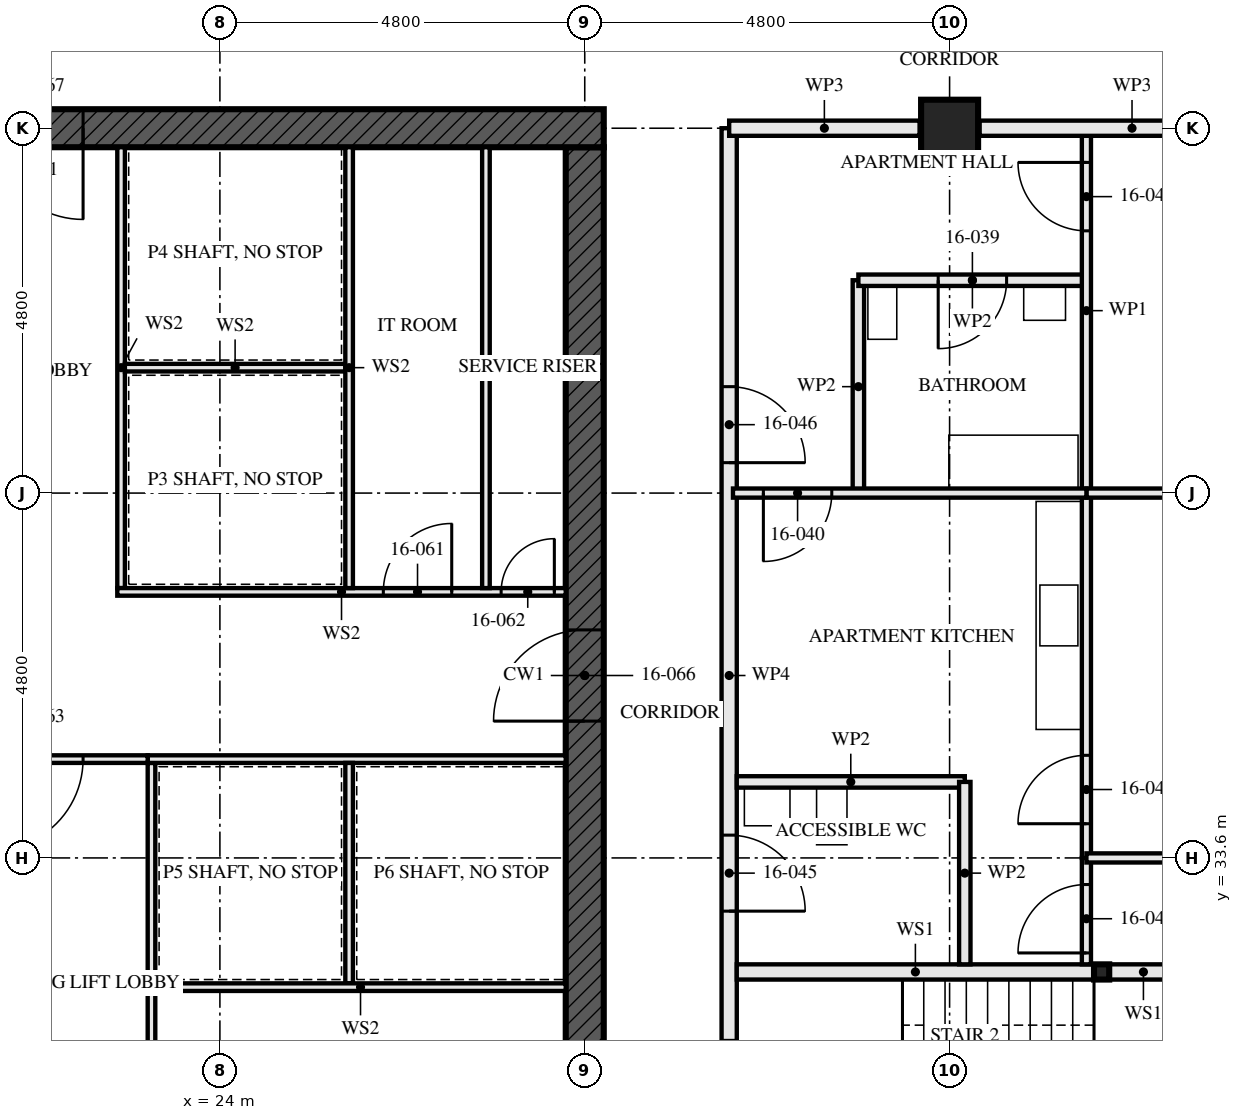
"""IFC4 building model, lengths in metres.
Left out: names, types, materials, properties, quantities, classifications, styles, units other than length and angle.
Written with IfcOpenShell. Run it as: python <this file> out.ifc"""

import sys

from ifc_helpers import new_model, si_unit, direction, frame, frame_2d, origin, origin_2d, place, context, subcontext, project, spatial, rectangle, hollow_rectangle, extrude, element, fill, save


model = new_model("IFC4")
c1 = context("Model", 3, precision=1e-05, world=origin(), true_north=direction((0.0, 1.0)))
c2 = subcontext(c1, "Body", "Model", "MODEL_VIEW")
j1 = project(units=[si_unit("LENGTHUNIT", "METRE"), si_unit("PLANEANGLEUNIT", "RADIAN")], contexts=[c1])
p1 = place(None, origin())
s1 = spatial("IfcSite", under=j1, at=p1, CompositionType="ELEMENT")
p2 = place(p1, origin())
s2 = spatial("IfcBuilding", under=s1, at=p2, CompositionType="ELEMENT")
p3 = place(p2, frame((0.0, 0.0, 62.0)))
s3 = spatial("IfcBuildingStorey", under=s2, at=p3, CompositionType="ELEMENT", Elevation=62.0)
p4 = place(p3, frame((33.6, 43.2, 0.0), z_axis=(0.0, 0.0, 1.0), x_axis=(0.0, 1.0, 0.0)))
e1 = element("IfcColumn", 1, at=p4, inside=s3, PredefinedType="COLUMN", context=c2, shape_type="SweptSolid", body=[
    extrude(hollow_rectangle(XDim=0.75, YDim=0.75, WallThickness=0.08, at=origin_2d()), origin(), (0.0, 0.0, 1.0), 3.5),
])
p5 = place(p3, frame((29.05, 43.2, -0.17), z_axis=(0.0, 0.0, 1.0), x_axis=(-1.0, 0.0, 0.0)))
e2 = element("IfcWall", 2, at=p5, inside=s3, PredefinedType="SHEAR", context=c2, shape_type="SweptSolid", body=[
    extrude(rectangle(XDim=14.9, YDim=0.5, at=frame_2d((7.45, 0.0))), origin(), (0.0, 0.0, 1.0), 3.5),
])
p6 = place(p5, frame((6.85, 0.0, 0.17)))
e3 = element("IfcOpeningElement", 3, at=p6, cuts=e2, PredefinedType="OPENING", context=c2, shape_type="SweptSolid", body=[
    extrude(rectangle(XDim=1.2, YDim=2.1, at=frame_2d((0.6, 1.05))), frame((0.0, 0.26, 0.0), z_axis=(0.0, -1.0, 0.0), x_axis=(1.0, 0.0, 0.0)), (0.0, 0.0, 1.0), 0.521),
])
p7 = place(p3, frame((28.8, 29.05, -0.17), z_axis=(0.0, 0.0, 1.0), x_axis=(0.0, 1.0, 0.0)))
e4 = element("IfcWall", 4, at=p7, inside=s3, PredefinedType="SHEAR", context=c2, shape_type="SweptSolid", body=[
    extrude(rectangle(XDim=13.9, YDim=0.5, at=frame_2d((6.95, 0.0))), origin(), (0.0, 0.0, 1.0), 3.5),
])
p8 = place(p7, frame((6.35, 0.0, 0.17)))
e5 = element("IfcOpeningElement", 5, at=p8, cuts=e4, PredefinedType="OPENING", context=c2, shape_type="SweptSolid", body=[
    extrude(rectangle(XDim=1.2, YDim=2.1, at=frame_2d((0.6, 1.05))), frame((0.0, 0.26, 0.0), z_axis=(0.0, -1.0, 0.0), x_axis=(1.0, 0.0, 0.0)), (0.0, 0.0, 1.0), 0.521),
])
p9 = place(p3, frame((35.6, 32.1, 0.0), z_axis=(0.0, 0.0, 1.0), x_axis=(1.0, 0.0, 0.0)))
e6 = element("IfcColumn", 6, at=p9, inside=s3, PredefinedType="COLUMN", context=c2, shape_type="SweptSolid", body=[
    extrude(hollow_rectangle(XDim=0.2, YDim=0.2, WallThickness=0.008, at=origin_2d()), origin(), (0.0, 0.0, 1.0), 3.33),
])
p10 = place(p3, frame((36.6, 32.1, 0.0), z_axis=(0.0, 0.0, 1.0), x_axis=(-1.0, 0.0, 0.0)))
e7 = element("IfcWall", 7, at=p10, inside=s3, PredefinedType="SOLIDWALL", context=c2, shape_type="SweptSolid", body=[
    extrude(rectangle(XDim=0.9, YDim=0.2, at=frame_2d((0.45, 0.0))), origin(), (0.0, 0.0, 1.0), 2.99),
])
p11 = place(p3, frame((35.5, 32.1, 0.0), z_axis=(0.0, 0.0, 1.0), x_axis=(-1.0, 0.0, 0.0)))
e8 = element("IfcWall", 8, at=p11, inside=s3, PredefinedType="SOLIDWALL", context=c2, shape_type="SweptSolid", body=[
    extrude(rectangle(XDim=4.7, YDim=0.2, at=frame_2d((2.35, 0.0))), origin(), (0.0, 0.0, 1.0), 2.99),
])
p12 = place(p3, frame((33.8, 32.2, 0.0), z_axis=(0.0, 0.0, 1.0), x_axis=(0.0, 1.0, 0.0)))
e9 = element("IfcWall", 9, at=p12, inside=s3, PredefinedType="PARTITIONING", context=c2, shape_type="SweptSolid", body=[
    extrude(rectangle(XDim=2.4, YDim=0.15, at=frame_2d((1.2, 0.0))), origin(), (0.0, 0.0, 1.0), 2.55),
])
p13 = place(p3, frame((33.8, 34.6, 0.0), z_axis=(0.0, 0.0, 1.0), x_axis=(-1.0, 0.0, 0.0)))
e10 = element("IfcWall", 10, at=p13, inside=s3, PredefinedType="PARTITIONING", context=c2, shape_type="SweptSolid", body=[
    extrude(rectangle(XDim=3.0, YDim=0.15, at=frame_2d((1.5, 0.0))), origin(), (0.0, 0.0, 1.0), 3.33),
])
p14 = place(p3, frame((35.4, 41.2, 0.0), z_axis=(0.0, 0.0, 1.0), x_axis=(-1.0, 0.0, 0.0)))
e11 = element("IfcWall", 11, at=p14, inside=s3, PredefinedType="PARTITIONING", context=c2, shape_type="SweptSolid", body=[
    extrude(rectangle(XDim=3.0, YDim=0.15, at=frame_2d((1.5, 0.0))), origin(), (0.0, 0.0, 1.0), 3.33),
])
p15 = place(p14, frame((1.05, 0.0, 0.0)))
e12 = element("IfcOpeningElement", 12, at=p15, cuts=e11, PredefinedType="OPENING", context=c2, shape_type="SweptSolid", body=[
    extrude(rectangle(XDim=0.9, YDim=2.1, at=frame_2d((0.45, 1.05))), frame((0.0, 0.085, 0.0), z_axis=(0.0, -1.0, 0.0), x_axis=(1.0, 0.0, 0.0)), (0.0, 0.0, 1.0), 0.171),
])
p16 = place(p3, frame((32.4, 38.4, 0.0), z_axis=(0.0, 0.0, 1.0), x_axis=(0.0, 1.0, 0.0)))
e13 = element("IfcWall", 13, at=p16, inside=s3, PredefinedType="PARTITIONING", context=c2, shape_type="SweptSolid", body=[
    extrude(rectangle(XDim=2.8, YDim=0.15, at=frame_2d((1.4, 0.0))), origin(), (0.0, 0.0, 1.0), 3.33),
])
p17 = place(p3, frame((35.4, 38.4, 0.0), z_axis=(0.0, 0.0, 1.0), x_axis=(-1.0, 0.0, 0.0)))
e14 = element("IfcWall", 14, at=p17, inside=s3, PredefinedType="PARTITIONING", context=c2, shape_type="SweptSolid", body=[
    extrude(rectangle(XDim=4.65, YDim=0.12, at=frame_2d((2.325, 0.0))), origin(), (0.0, 0.0, 1.0), 2.55),
])
p18 = place(p17, frame((3.35, 0.0, 0.0)))
e15 = element("IfcOpeningElement", 15, at=p18, cuts=e14, PredefinedType="OPENING", context=c2, shape_type="SweptSolid", body=[
    extrude(rectangle(XDim=0.9, YDim=2.1, at=frame_2d((0.45, 1.05))), frame((0.0, 0.071, 0.0), z_axis=(0.0, -1.0, 0.0), x_axis=(1.0, 0.0, 0.0)), (0.0, 0.0, 1.0), 0.141),
])
p19 = place(p3, frame((35.4, 32.2, 0.0), z_axis=(0.0, 0.0, 1.0), x_axis=(0.0, 1.0, 0.0)))
e16 = element("IfcWall", 16, at=p19, inside=s3, PredefinedType="PARTITIONING", context=c2, shape_type="SweptSolid", body=[
    extrude(rectangle(XDim=1.4, YDim=0.12, at=frame_2d((0.7, 0.0))), origin(), (0.0, 0.0, 1.0), 3.33),
])
p20 = place(p19, frame((0.15, 0.0, 0.0)))
e17 = element("IfcOpeningElement", 17, at=p20, cuts=e16, PredefinedType="OPENING", context=c2, shape_type="SweptSolid", body=[
    extrude(rectangle(XDim=0.9, YDim=2.1, at=frame_2d((0.45, 1.05))), frame((0.0, 0.071, 0.0), z_axis=(0.0, -1.0, 0.0), x_axis=(1.0, 0.0, 0.0)), (0.0, 0.0, 1.0), 0.141),
])
p21 = place(p3, frame((35.4, 33.6, 0.0), z_axis=(0.0, 0.0, 1.0), x_axis=(0.0, 1.0, 0.0)))
e18 = element("IfcWall", 18, at=p21, inside=s3, PredefinedType="PARTITIONING", context=c2, shape_type="SweptSolid", body=[
    extrude(rectangle(XDim=4.8, YDim=0.12, at=frame_2d((2.4, 0.0))), origin(), (0.0, 0.0, 1.0), 3.33),
])
p22 = place(p21, frame((0.45, 0.0, 0.0)))
e19 = element("IfcOpeningElement", 19, at=p22, cuts=e18, PredefinedType="OPENING", context=c2, shape_type="SweptSolid", body=[
    extrude(rectangle(XDim=0.9, YDim=2.1, at=frame_2d((0.45, 1.05))), frame((0.0, 0.071, 0.0), z_axis=(0.0, -1.0, 0.0), x_axis=(1.0, 0.0, 0.0)), (0.0, 0.0, 1.0), 0.141),
])
p23 = place(p3, frame((35.4, 38.4, 0.0), z_axis=(0.0, 0.0, 1.0), x_axis=(0.0, 1.0, 0.0)))
e20 = element("IfcWall", 20, at=p23, inside=s3, PredefinedType="PARTITIONING", context=c2, shape_type="SweptSolid", body=[
    extrude(rectangle(XDim=4.8, YDim=0.12, at=frame_2d((2.4, 0.0))), origin(), (0.0, 0.0, 1.0), 3.33),
])
p24 = place(p23, frame((3.45, 0.0, 0.0)))
e21 = element("IfcOpeningElement", 21, at=p24, cuts=e20, PredefinedType="OPENING", context=c2, shape_type="SweptSolid", body=[
    extrude(rectangle(XDim=0.9, YDim=2.1, at=frame_2d((0.45, 1.05))), frame((0.0, 0.071, 0.0), z_axis=(0.0, -1.0, 0.0), x_axis=(1.0, 0.0, 0.0)), (0.0, 0.0, 1.0), 0.141),
])
for number, where, z_axis, x_axis in (
    (22, (42.805, 33.6, 0.0), (0.0, 0.0, 1.0), (-1.0, 0.0, 0.0)),
    (23, (42.805, 38.4, 0.0), (0.0, 0.0, 1.0), (-1.0, 0.0, 0.0)),
):
    element("IfcWall", number, at=place(p3, frame(where, z_axis=z_axis, x_axis=x_axis)), inside=s3, PredefinedType="PARTITIONING", context=c2, shape_type="SweptSolid", body=[
        extrude(rectangle(XDim=7.405, YDim=0.12, at=frame_2d((3.703, 0.0))), origin(), (0.0, 0.0, 1.0), 2.55),
    ])
p25 = place(p3, frame((30.7, 28.8, 0.0), z_axis=(0.0, 0.0, 1.0), x_axis=(0.0, 1.0, 0.0)))
e24 = element("IfcWall", 24, at=p25, inside=s3, PredefinedType="PARTITIONING", context=c2, shape_type="SweptSolid", body=[
    extrude(rectangle(XDim=14.4, YDim=0.2, at=frame_2d((7.2, 0.0))), origin(), (0.0, 0.0, 1.0), 2.55),
])
p26 = place(p25, frame((1.4, 0.0, 0.0)))
e25 = element("IfcOpeningElement", 25, at=p26, cuts=e24, PredefinedType="OPENING", context=c2, shape_type="SweptSolid", body=[
    extrude(rectangle(XDim=1.0, YDim=2.1, at=frame_2d((0.5, 1.05))), frame((0.0, 0.111, 0.0), z_axis=(0.0, -1.0, 0.0), x_axis=(1.0, 0.0, 0.0)), (0.0, 0.0, 1.0), 0.221),
])
p27 = place(p25, frame((4.1, 0.0, 0.0)))
e26 = element("IfcOpeningElement", 26, at=p27, cuts=e24, PredefinedType="OPENING", context=c2, shape_type="SweptSolid", body=[
    extrude(rectangle(XDim=1.0, YDim=2.1, at=frame_2d((0.5, 1.05))), frame((0.0, 0.111, 0.0), z_axis=(0.0, -1.0, 0.0), x_axis=(1.0, 0.0, 0.0)), (0.0, 0.0, 1.0), 0.221),
])
p28 = place(p25, frame((10.0, 0.0, 0.0)))
e27 = element("IfcOpeningElement", 27, at=p28, cuts=e24, PredefinedType="OPENING", context=c2, shape_type="SweptSolid", body=[
    extrude(rectangle(XDim=1.0, YDim=2.1, at=frame_2d((0.5, 1.05))), frame((0.0, 0.111, 0.0), z_axis=(0.0, -1.0, 0.0), x_axis=(1.0, 0.0, 0.0)), (0.0, 0.0, 1.0), 0.221),
])
for number, where, z_axis, x_axis in (
    (28, (27.5, 37.15, 0.0), (0.0, 0.0, 1.0), (0.0, 1.0, 0.0)),
    (29, (22.7, 37.15, 0.0), (0.0, 0.0, 1.0), (0.0, 1.0, 0.0)),
):
    element("IfcWall", number, at=place(p3, frame(where, z_axis=z_axis, x_axis=x_axis)), inside=s3, PredefinedType="SOLIDWALL", context=c2, shape_type="SweptSolid", body=[
        extrude(rectangle(XDim=5.8, YDim=0.1, at=frame_2d((2.9, 0.0))), origin(), (0.0, 0.0, 1.0), 3.33),
    ])
p29 = place(p3, frame((23.1, 29.05, 0.0), z_axis=(0.0, 0.0, 1.0), x_axis=(0.0, 1.0, 0.0)))
e30 = element("IfcWall", 30, at=p29, inside=s3, PredefinedType="SOLIDWALL", context=c2, shape_type="SweptSolid", body=[
    extrude(rectangle(XDim=5.8, YDim=0.1, at=frame_2d((2.9, 0.0))), origin(), (0.0, 0.0, 1.0), 3.33),
])
p30 = place(p29, frame((1.0, 0.0, 0.0)))
e31 = element("IfcOpeningElement", 31, at=p30, cuts=e30, PredefinedType="OPENING", context=c2, shape_type="SweptSolid", body=[
    extrude(rectangle(XDim=0.7, YDim=2.1, at=frame_2d((0.35, 1.05))), frame((0.0, 0.061, 0.0), z_axis=(0.0, -1.0, 0.0), x_axis=(1.0, 0.0, 0.0)), (0.0, 0.0, 1.0), 0.121),
])
p31 = place(p3, frame((23.05, 34.9, 0.0), z_axis=(0.0, 0.0, 1.0), x_axis=(1.0, 0.0, 0.0)))
e32 = element("IfcWall", 32, at=p31, inside=s3, PredefinedType="SOLIDWALL", context=c2, shape_type="SweptSolid", body=[
    extrude(rectangle(XDim=5.5, YDim=0.1, at=frame_2d((2.75, 0.0))), origin(), (0.0, 0.0, 1.0), 3.33),
])
p32 = place(p3, frame((22.65, 37.1, 0.0), z_axis=(0.0, 0.0, 1.0), x_axis=(1.0, 0.0, 0.0)))
e33 = element("IfcWall", 33, at=p32, inside=s3, PredefinedType="SOLIDWALL", context=c2, shape_type="SweptSolid", body=[
    extrude(rectangle(XDim=5.9, YDim=0.1, at=frame_2d((2.95, 0.0))), origin(), (0.0, 0.0, 1.0), 3.33),
])
p33 = place(p32, frame((3.5, 0.0, 0.0)))
e34 = element("IfcOpeningElement", 34, at=p33, cuts=e33, PredefinedType="OPENING", context=c2, shape_type="SweptSolid", body=[
    extrude(rectangle(XDim=0.9, YDim=2.1, at=frame_2d((0.45, 1.05))), frame((0.0, 0.061, 0.0), z_axis=(0.0, -1.0, 0.0), x_axis=(1.0, 0.0, 0.0)), (0.0, 0.0, 1.0), 0.121),
])
p34 = place(p32, frame((5.05, 0.0, 0.0)))
e35 = element("IfcOpeningElement", 35, at=p34, cuts=e33, PredefinedType="OPENING", context=c2, shape_type="SweptSolid", body=[
    extrude(rectangle(XDim=0.7, YDim=2.1, at=frame_2d((0.35, 1.05))), frame((0.0, 0.061, 0.0), z_axis=(0.0, -1.0, 0.0), x_axis=(1.0, 0.0, 0.0)), (0.0, 0.0, 1.0), 0.121),
])
p35 = place(p3, frame((20.55, 34.9, 0.0), z_axis=(0.0, 0.0, 1.0), x_axis=(1.0, 0.0, 0.0)))
e36 = element("IfcWall", 36, at=p35, inside=s3, PredefinedType="SOLIDWALL", context=c2, shape_type="SweptSolid", body=[
    extrude(rectangle(XDim=2.5, YDim=0.1, at=frame_2d((1.25, 0.0))), origin(), (0.0, 0.0, 1.0), 3.33),
])
p36 = place(p35, frame((0.45, 0.0, 0.0)))
e37 = element("IfcOpeningElement", 37, at=p36, cuts=e36, PredefinedType="OPENING", context=c2, shape_type="SweptSolid", body=[
    extrude(rectangle(XDim=1.2, YDim=2.1, at=frame_2d((0.6, 1.05))), frame((0.0, 0.061, 0.0), z_axis=(0.0, -1.0, 0.0), x_axis=(1.0, 0.0, 0.0)), (0.0, 0.0, 1.0), 0.121),
])
p37 = place(p3, frame((22.75, 40.05, 0.0), z_axis=(0.0, 0.0, 1.0), x_axis=(1.0, 0.0, 0.0)))
e38 = element("IfcWall", 38, at=p37, inside=s3, PredefinedType="SOLIDWALL", context=c2, shape_type="SweptSolid", body=[
    extrude(rectangle(XDim=2.9, YDim=0.1, at=frame_2d((1.45, 0.0))), origin(), (0.0, 0.0, 1.0), 3.33),
])
p38 = place(p3, frame((25.7, 37.15, 0.0), z_axis=(0.0, 0.0, 1.0), x_axis=(0.0, 1.0, 0.0)))
e39 = element("IfcWall", 39, at=p38, inside=s3, PredefinedType="SOLIDWALL", context=c2, shape_type="SweptSolid", body=[
    extrude(rectangle(XDim=5.8, YDim=0.1, at=frame_2d((2.9, 0.0))), origin(), (0.0, 0.0, 1.0), 3.33),
])
p39 = place(p3, frame((25.7, 31.95, 0.0), z_axis=(0.0, 0.0, 1.0), x_axis=(0.0, 1.0, 0.0)))
e40 = element("IfcWall", 40, at=p39, inside=s3, PredefinedType="SOLIDWALL", context=c2, shape_type="SweptSolid", body=[
    extrude(rectangle(XDim=2.9, YDim=0.1, at=frame_2d((1.45, 0.0))), origin(), (0.0, 0.0, 1.0), 3.33),
])
p40 = place(p3, frame((23.15, 31.9, 0.0), z_axis=(0.0, 0.0, 1.0), x_axis=(1.0, 0.0, 0.0)))
e41 = element("IfcWall", 41, at=p40, inside=s3, PredefinedType="SOLIDWALL", context=c2, shape_type="SweptSolid", body=[
    extrude(rectangle(XDim=5.4, YDim=0.1, at=frame_2d((2.7, 0.0))), origin(), (0.0, 0.0, 1.0), 3.33),
])
p41 = place(p3, frame((38.005, 43.2, 0.0), z_axis=(0.0, 0.0, 1.0), x_axis=(-1.0, 0.0, 0.0)))
e42 = element("IfcWall", 42, at=p41, inside=s3, PredefinedType="PARTITIONING", context=c2, shape_type="SweptSolid", body=[
    extrude(rectangle(XDim=4.01, YDim=0.2, at=frame_2d((2.005, 0.0))), origin(), (0.0, 0.0, 1.0), 2.32),
])
p42 = place(p3, frame((33.205, 43.2, 0.0), z_axis=(0.0, 0.0, 1.0), x_axis=(-1.0, 0.0, 0.0)))
e43 = element("IfcWall", 43, at=p42, inside=s3, PredefinedType="PARTITIONING", context=c2, shape_type="SweptSolid", body=[
    extrude(rectangle(XDim=2.505, YDim=0.2, at=frame_2d((1.252, 0.0))), origin(), (0.0, 0.0, 1.0), 2.32),
])
p43 = place(p15, origin())
e44 = element("IfcDoor", 44, at=p43, inside=s3, OperationType="SINGLE_SWING_LEFT", PredefinedType="DOOR", context=c2, shape_type="SweptSolid", body=[
    extrude(rectangle(XDim=0.9, YDim=2.1, at=frame_2d((0.45, 1.05))), frame((0.0, 0.022, 0.0), z_axis=(0.0, -1.0, 0.0), x_axis=(1.0, 0.0, 0.0)), (0.0, 0.0, 1.0), 0.044),
])
fill(e12, e44)
p44 = place(p18, origin())
e45 = element("IfcDoor", 45, at=p44, inside=s3, OperationType="SINGLE_SWING_LEFT", PredefinedType="DOOR", context=c2, shape_type="SweptSolid", body=[
    extrude(rectangle(XDim=0.9, YDim=2.1, at=frame_2d((0.45, 1.05))), frame((0.0, 0.022, 0.0), z_axis=(0.0, -1.0, 0.0), x_axis=(1.0, 0.0, 0.0)), (0.0, 0.0, 1.0), 0.044),
])
fill(e15, e45)
p45 = place(p20, origin())
e46 = element("IfcDoor", 46, at=p45, inside=s3, OperationType="SINGLE_SWING_RIGHT", PredefinedType="DOOR", context=c2, shape_type="SweptSolid", body=[
    extrude(rectangle(XDim=0.9, YDim=2.1, at=frame_2d((0.45, 1.05))), frame((0.0, 0.022, 0.0), z_axis=(0.0, -1.0, 0.0), x_axis=(1.0, 0.0, 0.0)), (0.0, 0.0, 1.0), 0.044),
])
fill(e17, e46)
p46 = place(p22, origin())
e47 = element("IfcDoor", 47, at=p46, inside=s3, OperationType="SINGLE_SWING_RIGHT", PredefinedType="DOOR", context=c2, shape_type="SweptSolid", body=[
    extrude(rectangle(XDim=0.9, YDim=2.1, at=frame_2d((0.45, 1.05))), frame((0.0, 0.022, 0.0), z_axis=(0.0, -1.0, 0.0), x_axis=(1.0, 0.0, 0.0)), (0.0, 0.0, 1.0), 0.044),
])
fill(e19, e47)
p47 = place(p24, origin())
e48 = element("IfcDoor", 48, at=p47, inside=s3, OperationType="SINGLE_SWING_LEFT", PredefinedType="DOOR", context=c2, shape_type="SweptSolid", body=[
    extrude(rectangle(XDim=0.9, YDim=2.1, at=frame_2d((0.45, 1.05))), frame((0.0, 0.022, 0.0), z_axis=(0.0, -1.0, 0.0), x_axis=(1.0, 0.0, 0.0)), (0.0, 0.0, 1.0), 0.044),
])
fill(e21, e48)
p48 = place(p27, frame((1.0, 0.0, 0.0), z_axis=(0.0, 0.0, 1.0), x_axis=(-1.0, 0.0, 0.0)))
e49 = element("IfcDoor", 49, at=p48, inside=s3, OperationType="SINGLE_SWING_LEFT", PredefinedType="DOOR", context=c2, shape_type="SweptSolid", body=[
    extrude(rectangle(XDim=1.0, YDim=2.1, at=frame_2d((0.5, 1.05))), frame((0.0, 0.027, 0.0), z_axis=(0.0, -1.0, 0.0), x_axis=(1.0, 0.0, 0.0)), (0.0, 0.0, 1.0), 0.054),
])
fill(e26, e49)
p49 = place(p28, frame((1.0, 0.0, 0.0), z_axis=(0.0, 0.0, 1.0), x_axis=(-1.0, 0.0, 0.0)))
e50 = element("IfcDoor", 50, at=p49, inside=s3, OperationType="SINGLE_SWING_LEFT", PredefinedType="DOOR", context=c2, shape_type="SweptSolid", body=[
    extrude(rectangle(XDim=1.0, YDim=2.1, at=frame_2d((0.5, 1.05))), frame((0.0, 0.027, 0.0), z_axis=(0.0, -1.0, 0.0), x_axis=(1.0, 0.0, 0.0)), (0.0, 0.0, 1.0), 0.054),
])
fill(e27, e50)
p50 = place(p33, origin())
e51 = element("IfcDoor", 51, at=p50, inside=s3, OperationType="SINGLE_SWING_LEFT", PredefinedType="DOOR", context=c2, shape_type="SweptSolid", body=[
    extrude(rectangle(XDim=0.9, YDim=2.1, at=frame_2d((0.45, 1.05))), frame((0.0, 0.027, 0.0), z_axis=(0.0, -1.0, 0.0), x_axis=(1.0, 0.0, 0.0)), (0.0, 0.0, 1.0), 0.054),
])
fill(e34, e51)
p51 = place(p34, origin())
e52 = element("IfcDoor", 52, at=p51, inside=s3, OperationType="SINGLE_SWING_LEFT", PredefinedType="DOOR", context=c2, shape_type="SweptSolid", body=[
    extrude(rectangle(XDim=0.7, YDim=2.1, at=frame_2d((0.35, 1.05))), frame((0.0, 0.027, 0.0), z_axis=(0.0, -1.0, 0.0), x_axis=(1.0, 0.0, 0.0)), (0.0, 0.0, 1.0), 0.054),
])
fill(e35, e52)
p52 = place(p36, frame((1.2, 0.0, 0.0), z_axis=(0.0, 0.0, 1.0), x_axis=(-1.0, 0.0, 0.0)))
e53 = element("IfcDoor", 53, at=p52, inside=s3, OperationType="SINGLE_SWING_LEFT", PredefinedType="DOOR", context=c2, shape_type="SweptSolid", body=[
    extrude(rectangle(XDim=1.2, YDim=2.1, at=frame_2d((0.6, 1.05))), frame((0.0, 0.027, 0.0), z_axis=(0.0, -1.0, 0.0), x_axis=(1.0, 0.0, 0.0)), (0.0, 0.0, 1.0), 0.054),
])
fill(e37, e53)
p53 = place(p8, origin())
e54 = element("IfcDoor", 54, at=p53, inside=s3, OperationType="SINGLE_SWING_LEFT", PredefinedType="DOOR", context=c2, shape_type="SweptSolid", body=[
    extrude(rectangle(XDim=1.2, YDim=2.1, at=frame_2d((0.6, 1.05))), frame((0.0, 0.027, 0.0), z_axis=(0.0, -1.0, 0.0), x_axis=(1.0, 0.0, 0.0)), (0.0, 0.0, 1.0), 0.054),
])
fill(e5, e54)
p54 = place(p6, origin())
e55 = element("IfcDoor", 55, at=p54, inside=s3, OperationType="SINGLE_SWING_LEFT", PredefinedType="DOOR", context=c2, shape_type="SweptSolid", body=[
    extrude(rectangle(XDim=1.2, YDim=2.1, at=frame_2d((0.6, 1.05))), frame((0.0, 0.027, 0.0), z_axis=(0.0, -1.0, 0.0), x_axis=(1.0, 0.0, 0.0)), (0.0, 0.0, 1.0), 0.054),
])
fill(e3, e55)
save(model, sys.argv[1])
